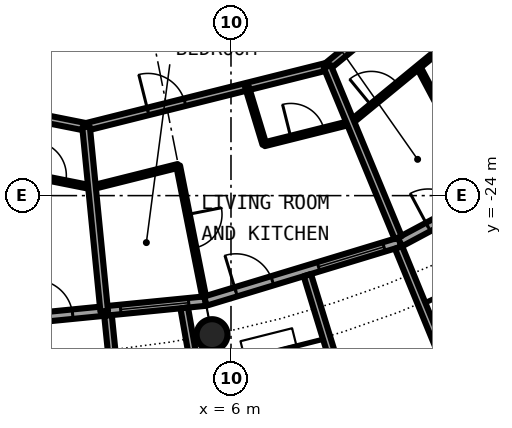
"""IFC4 building model, lengths in metres.
Left out: names, types, materials, properties, quantities, classifications, styles, units other than length and angle.
Written with IfcOpenShell. Run it as: python <this file> out.ifc"""

import sys

from ifc_helpers import new_model, si_unit, direction, frame, frame_2d, origin, origin_2d, place, context, subcontext, project, spatial, rectangle, circle, hollow_circle, extrude, element, fill, save


model = new_model("IFC4")
c1 = context("Model", 3, precision=1e-05, world=origin(), true_north=direction((0.0, 1.0)))
c2 = subcontext(c1, "Body", "Model", "MODEL_VIEW")
j1 = project(units=[si_unit("LENGTHUNIT", "METRE"), si_unit("PLANEANGLEUNIT", "RADIAN")], contexts=[c1])
p1 = place(None, origin())
s1 = spatial("IfcSite", under=j1, at=p1, CompositionType="ELEMENT")
p2 = place(p1, origin())
s2 = spatial("IfcBuilding", under=s1, at=p2, CompositionType="ELEMENT")
p3 = place(p2, frame((0.0, 0.0, 154.35)))
s3 = spatial("IfcBuildingStorey", under=s2, at=p3, CompositionType="ELEMENT", Elevation=154.35)
p4 = place(p3, frame((5.501, -27.658, 0.0), z_axis=(0.0, 0.0, 1.0), x_axis=(1.0, 0.0, 0.0)))
e1 = element("IfcColumn", 1, at=p4, inside=s3, PredefinedType="COLUMN", context=c2, shape_type="SweptSolid", body=[
    extrude(hollow_circle(Radius=0.406, WallThickness=0.04, at=origin_2d()), origin(), (0.0, 0.0, 1.0), 3.05),
])
p5 = place(p3, frame((0.0, -27.3, 0.0), z_axis=(0.0, 0.0, 1.0), x_axis=(0.995173996315, 0.098126026407, 0.0)))
e2 = element("IfcWall", 2, at=p5, inside=s3, PredefinedType="SOLIDWALL", context=c2, shape_type="SweptSolid", body=[
    extrude(rectangle(XDim=5.352, YDim=0.25, at=frame_2d((2.676, 0.0))), origin(), (0.0, 0.0, 1.0), 2.7),
])
p6 = place(p5, frame((0.841, 0.0, 0.0)))
e3 = element("IfcOpeningElement", 3, at=p6, cuts=e2, PredefinedType="OPENING", context=c2, shape_type="SweptSolid", body=[
    extrude(rectangle(XDim=1.0, YDim=2.2, at=frame_2d((0.5, 1.1))), frame((0.0, 0.135, 0.0), z_axis=(0.0, -1.0, 0.0), x_axis=(1.0, 0.0, 0.0)), (0.0, 0.0, 1.0), 0.27),
])
p7 = place(p5, frame((3.111, 0.0, 0.3)))
e4 = element("IfcOpeningElement", 4, at=p7, cuts=e2, PredefinedType="OPENING", context=c2, shape_type="SweptSolid", body=[
    extrude(rectangle(XDim=1.8, YDim=2.1, at=frame_2d((0.9, 1.05))), frame((0.0, 0.135, 0.0), z_axis=(0.0, -1.0, 0.0), x_axis=(1.0, 0.0, 0.0)), (0.0, 0.0, 1.0), 0.27),
])
p8 = place(p3, frame((2.764, -27.153, -0.03), z_axis=(0.0, 0.0, 1.0), x_axis=(0.101505487237, -0.994834979311, 0.0)))
e5 = element("IfcWall", 5, at=p8, inside=s3, PredefinedType="SOLIDWALL", context=c2, shape_type="SweptSolid", body=[
    extrude(rectangle(XDim=3.007, YDim=0.2, at=frame_2d((1.503, 0.0))), origin(), (0.0, 0.0, 1.0), 2.73),
])
p9 = place(p3, frame((4.769, -26.956, -0.03), z_axis=(0.0, 0.0, 1.0), x_axis=(0.174056778901, -0.984735618183, 0.0)))
e6 = element("IfcWall", 6, at=p9, inside=s3, PredefinedType="SOLIDWALL", context=c2, shape_type="SweptSolid", body=[
    extrude(rectangle(XDim=2.925, YDim=0.2, at=frame_2d((1.462, 0.0))), origin(), (0.0, 0.0, 1.0), 2.73),
])
p10 = place(p3, frame((5.326, -26.775, 0.0), z_axis=(0.0, 0.0, 1.0), x_axis=(0.956965678721, 0.290201119486, 0.0)))
e7 = element("IfcWall", 7, at=p10, inside=s3, PredefinedType="SOLIDWALL", context=c2, shape_type="SweptSolid", body=[
    extrude(rectangle(XDim=5.351, YDim=0.25, at=frame_2d((2.676, 0.0))), origin(), (0.0, 0.0, 1.0), 2.7),
])
p11 = place(p10, frame((0.841, 0.0, 0.0)))
e8 = element("IfcOpeningElement", 8, at=p11, cuts=e7, PredefinedType="OPENING", context=c2, shape_type="SweptSolid", body=[
    extrude(rectangle(XDim=1.0, YDim=2.2, at=frame_2d((0.5, 1.1))), frame((0.0, 0.135, 0.0), z_axis=(0.0, -1.0, 0.0), x_axis=(1.0, 0.0, 0.0)), (0.0, 0.0, 1.0), 0.27),
])
p12 = place(p10, frame((3.111, 0.0, 0.3)))
e9 = element("IfcOpeningElement", 9, at=p12, cuts=e7, PredefinedType="OPENING", context=c2, shape_type="SweptSolid", body=[
    extrude(rectangle(XDim=1.8, YDim=2.1, at=frame_2d((0.9, 1.05))), frame((0.0, 0.135, 0.0), z_axis=(0.0, -1.0, 0.0), x_axis=(1.0, 0.0, 0.0)), (0.0, 0.0, 1.0), 0.27),
])
p13 = place(p3, frame((8.82, -29.093, -0.03), z_axis=(0.0, 0.0, 1.0), x_axis=(0.941461077774, 0.337121697664, 0.0)))
e10 = element("IfcWall", 10, at=p13, inside=s3, PredefinedType="SOLIDWALL", context=c2, shape_type="SweptSolid", body=[
    extrude(rectangle(XDim=2.993, YDim=0.2, at=frame_2d((1.497, 0.0))), origin(), (0.0, 0.0, 1.0), 2.73),
])
p14 = place(p13, frame((0.457, 0.0, 0.33)))
e11 = element("IfcOpeningElement", 11, at=p14, cuts=e10, PredefinedType="OPENING", context=c2, shape_type="SweptSolid", body=[
    extrude(circle(Radius=1.04, at=frame_2d((1.04, 1.04))), frame((0.0, 0.11, 0.0), z_axis=(0.0, -1.0, 0.0), x_axis=(1.0, 0.0, 0.0)), (0.0, 0.0, 1.0), 0.22),
])
p15 = place(p3, frame((8.009, -26.092, -0.03), z_axis=(0.0, 0.0, 1.0), x_axis=(0.293406695073, -0.955987715029, 0.0)))
e12 = element("IfcWall", 12, at=p15, inside=s3, PredefinedType="SOLIDWALL", context=c2, shape_type="SweptSolid", body=[
    extrude(rectangle(XDim=3.006, YDim=0.2, at=frame_2d((1.503, 0.0))), origin(), (0.0, 0.0, 1.0), 2.73),
])
p16 = place(p3, frame((10.409, -25.364, -0.03), z_axis=(0.0, 0.0, 1.0), x_axis=(0.379509886562, -0.925187681501, 0.0)))
e13 = element("IfcWall", 13, at=p16, inside=s3, PredefinedType="SOLIDWALL", context=c2, shape_type="SweptSolid", body=[
    extrude(rectangle(XDim=2.883, YDim=0.2, at=frame_2d((1.441, 0.0))), origin(), (0.0, 0.0, 1.0), 2.73),
])
p17 = place(p3, frame((10.447, -25.222, 0.0), z_axis=(0.0, 0.0, 1.0), x_axis=(0.881915646801, 0.471407246368, 0.0)))
e14 = element("IfcWall", 14, at=p17, inside=s3, PredefinedType="SOLIDWALL", context=c2, shape_type="SweptSolid", body=[
    extrude(rectangle(XDim=5.352, YDim=0.25, at=frame_2d((2.676, 0.0))), origin(), (0.0, 0.0, 1.0), 2.7),
])
p18 = place(p17, frame((0.841, 0.0, 0.0)))
e15 = element("IfcOpeningElement", 15, at=p18, cuts=e14, PredefinedType="OPENING", context=c2, shape_type="SweptSolid", body=[
    extrude(rectangle(XDim=1.0, YDim=2.2, at=frame_2d((0.5, 1.1))), frame((0.0, 0.135, 0.0), z_axis=(0.0, -1.0, 0.0), x_axis=(1.0, 0.0, 0.0)), (0.0, 0.0, 1.0), 0.27),
])
p19 = place(p17, frame((3.111, 0.0, 0.3)))
e16 = element("IfcOpeningElement", 16, at=p19, cuts=e14, PredefinedType="OPENING", context=c2, shape_type="SweptSolid", body=[
    extrude(rectangle(XDim=1.8, YDim=2.1, at=frame_2d((0.9, 1.05))), frame((0.0, 0.135, 0.0), z_axis=(0.0, -1.0, 0.0), x_axis=(1.0, 0.0, 0.0)), (0.0, 0.0, 1.0), 0.27),
])
p20 = place(p3, frame((2.341, -23.785, 0.0), z_axis=(0.0, 0.0, 1.0), x_axis=(0.970124059177, 0.242609376996, 0.0)))
e17 = element("IfcWall", 17, at=p20, inside=s3, PredefinedType="PARTITIONING", context=c2, shape_type="SweptSolid", body=[
    extrude(rectangle(XDim=2.337, YDim=0.1, at=frame_2d((1.168, 0.0))), origin(), (0.0, 0.0, 1.0), 2.7),
])
p21 = place(p3, frame((6.878, -22.649, 0.0), z_axis=(0.0, 0.0, 1.0), x_axis=(0.9700564467, 0.242879579658, 0.0)))
e18 = element("IfcWall", 18, at=p21, inside=s3, PredefinedType="PARTITIONING", context=c2, shape_type="SweptSolid", body=[
    extrude(rectangle(XDim=2.338, YDim=0.1, at=frame_2d((1.169, 0.0))), origin(), (0.0, 0.0, 1.0), 2.7),
])
p22 = place(p21, frame((0.719, 0.0, 0.0)))
e19 = element("IfcOpeningElement", 19, at=p22, cuts=e18, PredefinedType="OPENING", context=c2, shape_type="SweptSolid", body=[
    extrude(rectangle(XDim=0.9, YDim=2.3, at=frame_2d((0.45, 1.15))), frame((0.0, 0.06, 0.0), z_axis=(0.0, -1.0, 0.0), x_axis=(1.0, 0.0, 0.0)), (0.0, 0.0, 1.0), 0.12),
])
p23 = place(p3, frame((0.074, -23.334, 0.0), z_axis=(0.0, 0.0, 1.0), x_axis=(0.98081942231, -0.194918600496, 0.0)))
e20 = element("IfcWall", 20, at=p23, inside=s3, PredefinedType="PARTITIONING", context=c2, shape_type="SweptSolid", body=[
    extrude(rectangle(XDim=2.313, YDim=0.1, at=frame_2d((1.157, 0.0))), origin(), (0.0, 0.0, 1.0), 2.7),
])
p24 = place(p23, frame((0.707, 0.0, 0.0)))
e21 = element("IfcOpeningElement", 21, at=p24, cuts=e20, PredefinedType="OPENING", context=c2, shape_type="SweptSolid", body=[
    extrude(rectangle(XDim=0.9, YDim=2.3, at=frame_2d((0.45, 1.15))), frame((0.0, 0.06, 0.0), z_axis=(0.0, -1.0, 0.0), x_axis=(1.0, 0.0, 0.0)), (0.0, 0.0, 1.0), 0.12),
])
p25 = place(p3, frame((9.146, -22.081, 0.0), z_axis=(0.0, 0.0, 1.0), x_axis=(0.772956112865, 0.634459492469, 0.0)))
e22 = element("IfcWall", 22, at=p25, inside=s3, PredefinedType="PARTITIONING", context=c2, shape_type="SweptSolid", body=[
    extrude(rectangle(XDim=6.938, YDim=0.1, at=frame_2d((3.469, 0.0))), origin(), (0.0, 0.0, 1.0), 2.7),
])
p26 = place(p25, frame((3.018, 0.0, 0.0)))
e23 = element("IfcOpeningElement", 23, at=p26, cuts=e22, PredefinedType="OPENING", context=c2, shape_type="SweptSolid", body=[
    extrude(rectangle(XDim=0.9, YDim=2.3, at=frame_2d((0.45, 1.15))), frame((0.0, 0.06, 0.0), z_axis=(0.0, -1.0, 0.0), x_axis=(1.0, 0.0, 0.0)), (0.0, 0.0, 1.0), 0.12),
])
p27 = place(p25, frame((0.709, 0.0, 0.0)))
e24 = element("IfcOpeningElement", 24, at=p27, cuts=e22, PredefinedType="OPENING", context=c2, shape_type="SweptSolid", body=[
    extrude(rectangle(XDim=0.9, YDim=2.3, at=frame_2d((0.45, 1.15))), frame((0.0, 0.06, 0.0), z_axis=(0.0, -1.0, 0.0), x_axis=(1.0, 0.0, 0.0)), (0.0, 0.0, 1.0), 0.12),
])
p28 = place(p3, frame((2.186, -22.193, 0.0), z_axis=(0.0, 0.0, 1.0), x_axis=(0.97003047456, 0.242983288366, 0.0)))
e25 = element("IfcWall", 25, at=p28, inside=s3, PredefinedType="PARTITIONING", context=c2, shape_type="SweptSolid", body=[
    extrude(rectangle(XDim=6.544, YDim=0.2, at=frame_2d((3.272, 0.0))), origin(), (0.0, 0.0, 1.0), 2.7),
])
p29 = place(p28, frame((1.681, 0.0, 0.0)))
e26 = element("IfcOpeningElement", 26, at=p29, cuts=e25, PredefinedType="OPENING", context=c2, shape_type="SweptSolid", body=[
    extrude(rectangle(XDim=1.0, YDim=2.3, at=frame_2d((0.5, 1.15))), frame((0.0, 0.11, 0.0), z_axis=(0.0, -1.0, 0.0), x_axis=(1.0, 0.0, 0.0)), (0.0, 0.0, 1.0), 0.22),
])
p30 = place(p3, frame((-10.512, -19.667, 0.0), z_axis=(0.0, 0.0, 1.0), x_axis=(0.980780341017, -0.195115152343, 0.0)))
e27 = element("IfcWall", 27, at=p30, inside=s3, PredefinedType="PARTITIONING", context=c2, shape_type="SweptSolid", body=[
    extrude(rectangle(XDim=12.947, YDim=0.2, at=frame_2d((6.473, 0.0))), origin(), (0.0, 0.0, 1.0), 2.7),
])
p31 = place(p30, frame((4.894, 0.0, 0.0)))
e28 = element("IfcOpeningElement", 28, at=p31, cuts=e27, PredefinedType="OPENING", context=c2, shape_type="SweptSolid", body=[
    extrude(rectangle(XDim=1.0, YDim=2.3, at=frame_2d((0.5, 1.15))), frame((0.0, 0.11, 0.0), z_axis=(0.0, -1.0, 0.0), x_axis=(1.0, 0.0, 0.0)), (0.0, 0.0, 1.0), 0.22),
])
p32 = place(p3, frame((8.534, -20.603, 0.0), z_axis=(0.0, 0.0, 1.0), x_axis=(0.772983503654, 0.634426121056, 0.0)))
e29 = element("IfcWall", 29, at=p32, inside=s3, PredefinedType="PARTITIONING", context=c2, shape_type="SweptSolid", body=[
    extrude(rectangle(XDim=12.947, YDim=0.2, at=frame_2d((6.474, 0.0))), origin(), (0.0, 0.0, 1.0), 2.7),
])
p33 = place(p32, frame((4.895, 0.0, 0.0)))
e30 = element("IfcOpeningElement", 30, at=p33, cuts=e29, PredefinedType="OPENING", context=c2, shape_type="SweptSolid", body=[
    extrude(rectangle(XDim=1.0, YDim=2.3, at=frame_2d((0.5, 1.15))), frame((0.0, 0.11, 0.0), z_axis=(0.0, -1.0, 0.0), x_axis=(1.0, 0.0, 0.0)), (0.0, 0.0, 1.0), 0.22),
])
p34 = place(p3, frame((2.186, -22.193, 0.0), z_axis=(0.0, 0.0, 1.0), x_axis=(0.098070432075, -0.995179476453, 0.0)))
e31 = element("IfcWall", 31, at=p34, inside=s3, PredefinedType="PARTITIONING", context=c2, shape_type="SweptSolid", body=[
    extrude(rectangle(XDim=4.874, YDim=0.2, at=frame_2d((2.437, 0.0))), origin(), (0.0, 0.0, 1.0), 2.7),
])
p35 = place(p3, frame((4.61, -23.217, 0.0), z_axis=(0.0, 0.0, 1.0), x_axis=(0.194816685017, -0.980839670506, 0.0)))
e32 = element("IfcWall", 32, at=p35, inside=s3, PredefinedType="PARTITIONING", context=c2, shape_type="SweptSolid", body=[
    extrude(rectangle(XDim=3.505, YDim=0.1, at=frame_2d((1.752, 0.0))), origin(), (0.0, 0.0, 1.0), 2.7),
])
p36 = place(p35, frame((1.303, 0.0, 0.0)))
e33 = element("IfcOpeningElement", 33, at=p36, cuts=e32, PredefinedType="OPENING", context=c2, shape_type="SweptSolid", body=[
    extrude(rectangle(XDim=0.9, YDim=2.3, at=frame_2d((0.45, 1.15))), frame((0.0, 0.06, 0.0), z_axis=(0.0, -1.0, 0.0), x_axis=(1.0, 0.0, 0.0)), (0.0, 0.0, 1.0), 0.12),
])
p37 = place(p3, frame((8.534, -20.603, 0.0), z_axis=(0.0, 0.0, 1.0), x_axis=(0.382651153718, -0.923892902104, 0.0)))
e34 = element("IfcWall", 34, at=p37, inside=s3, PredefinedType="PARTITIONING", context=c2, shape_type="SweptSolid", body=[
    extrude(rectangle(XDim=4.874, YDim=0.2, at=frame_2d((2.437, 0.0))), origin(), (0.0, 0.0, 1.0), 2.7),
])
p38 = place(p3, frame((10.934, -20.614, 0.0), z_axis=(0.0, 0.0, 1.0), x_axis=(0.468594334564, -0.883413464701, 0.0)))
e35 = element("IfcWall", 35, at=p38, inside=s3, PredefinedType="PARTITIONING", context=c2, shape_type="SweptSolid", body=[
    extrude(rectangle(XDim=3.841, YDim=0.1, at=frame_2d((1.92, 0.0))), origin(), (0.0, 0.0, 1.0), 2.7),
])
p39 = place(p3, frame((6.418, -21.133, 0.0), z_axis=(0.0, 0.0, 1.0), x_axis=(0.290358126892, -0.95691805195, 0.0)))
e36 = element("IfcWall", 36, at=p39, inside=s3, PredefinedType="PARTITIONING", context=c2, shape_type="SweptSolid", body=[
    extrude(rectangle(XDim=1.584, YDim=0.1, at=frame_2d((0.792, 0.0))), origin(), (0.0, 0.0, 1.0), 2.7),
])
p40 = place(p6, origin())
e37 = element("IfcDoor", 37, at=p40, inside=s3, OperationType="SINGLE_SWING_LEFT", PredefinedType="DOOR", context=c2, shape_type="SweptSolid", body=[
    extrude(rectangle(XDim=1.0, YDim=2.2, at=frame_2d((0.5, 1.1))), frame((0.0, 0.025, 0.0), z_axis=(0.0, -1.0, 0.0), x_axis=(1.0, 0.0, 0.0)), (0.0, 0.0, 1.0), 0.05),
])
fill(e3, e37)
p41 = place(p7, origin())
e38 = element("IfcWindow", 38, at=p41, inside=s3, PartitioningType="SINGLE_PANEL", PredefinedType="WINDOW", context=c2, shape_type="SweptSolid", body=[
    extrude(rectangle(XDim=1.8, YDim=2.1, at=frame_2d((0.9, 1.05))), frame((0.0, 0.03, 0.0), z_axis=(0.0, -1.0, 0.0), x_axis=(1.0, 0.0, 0.0)), (0.0, 0.0, 1.0), 0.06),
])
fill(e4, e38)
p42 = place(p11, origin())
e39 = element("IfcDoor", 39, at=p42, inside=s3, OperationType="SINGLE_SWING_LEFT", PredefinedType="DOOR", context=c2, shape_type="SweptSolid", body=[
    extrude(rectangle(XDim=1.0, YDim=2.2, at=frame_2d((0.5, 1.1))), frame((0.0, 0.025, 0.0), z_axis=(0.0, -1.0, 0.0), x_axis=(1.0, 0.0, 0.0)), (0.0, 0.0, 1.0), 0.05),
])
fill(e8, e39)
p43 = place(p12, origin())
e40 = element("IfcWindow", 40, at=p43, inside=s3, PartitioningType="SINGLE_PANEL", PredefinedType="WINDOW", context=c2, shape_type="SweptSolid", body=[
    extrude(rectangle(XDim=1.8, YDim=2.1, at=frame_2d((0.9, 1.05))), frame((0.0, 0.03, 0.0), z_axis=(0.0, -1.0, 0.0), x_axis=(1.0, 0.0, 0.0)), (0.0, 0.0, 1.0), 0.06),
])
fill(e9, e40)
p44 = place(p18, origin())
e41 = element("IfcDoor", 41, at=p44, inside=s3, OperationType="SINGLE_SWING_LEFT", PredefinedType="DOOR", context=c2, shape_type="SweptSolid", body=[
    extrude(rectangle(XDim=1.0, YDim=2.2, at=frame_2d((0.5, 1.1))), frame((0.0, 0.025, 0.0), z_axis=(0.0, -1.0, 0.0), x_axis=(1.0, 0.0, 0.0)), (0.0, 0.0, 1.0), 0.05),
])
fill(e15, e41)
p45 = place(p24, origin())
e42 = element("IfcDoor", 42, at=p45, inside=s3, OperationType="SINGLE_SWING_RIGHT", PredefinedType="DOOR", context=c2, shape_type="SweptSolid", body=[
    extrude(rectangle(XDim=0.9, YDim=2.3, at=frame_2d((0.45, 1.15))), frame((0.0, 0.025, 0.0), z_axis=(0.0, -1.0, 0.0), x_axis=(1.0, 0.0, 0.0)), (0.0, 0.0, 1.0), 0.05),
])
fill(e21, e42)
p46 = place(p29, origin())
e43 = element("IfcDoor", 43, at=p46, inside=s3, OperationType="SINGLE_SWING_LEFT", PredefinedType="DOOR", context=c2, shape_type="SweptSolid", body=[
    extrude(rectangle(XDim=1.0, YDim=2.3, at=frame_2d((0.5, 1.15))), frame((0.0, 0.025, 0.0), z_axis=(0.0, -1.0, 0.0), x_axis=(1.0, 0.0, 0.0)), (0.0, 0.0, 1.0), 0.05),
])
fill(e26, e43)
p47 = place(p22, origin())
e44 = element("IfcDoor", 44, at=p47, inside=s3, OperationType="SINGLE_SWING_LEFT", PredefinedType="DOOR", context=c2, shape_type="SweptSolid", body=[
    extrude(rectangle(XDim=0.9, YDim=2.3, at=frame_2d((0.45, 1.15))), frame((0.0, 0.025, 0.0), z_axis=(0.0, -1.0, 0.0), x_axis=(1.0, 0.0, 0.0)), (0.0, 0.0, 1.0), 0.05),
])
fill(e19, e44)
p48 = place(p36, origin())
e45 = element("IfcDoor", 45, at=p48, inside=s3, OperationType="SINGLE_SWING_RIGHT", PredefinedType="DOOR", context=c2, shape_type="SweptSolid", body=[
    extrude(rectangle(XDim=0.9, YDim=2.3, at=frame_2d((0.45, 1.15))), frame((0.0, 0.025, 0.0), z_axis=(0.0, -1.0, 0.0), x_axis=(1.0, 0.0, 0.0)), (0.0, 0.0, 1.0), 0.05),
])
fill(e33, e45)
p49 = place(p27, origin())
e46 = element("IfcDoor", 46, at=p49, inside=s3, OperationType="SINGLE_SWING_LEFT", PredefinedType="DOOR", context=c2, shape_type="SweptSolid", body=[
    extrude(rectangle(XDim=0.9, YDim=2.3, at=frame_2d((0.45, 1.15))), frame((0.0, 0.025, 0.0), z_axis=(0.0, -1.0, 0.0), x_axis=(1.0, 0.0, 0.0)), (0.0, 0.0, 1.0), 0.05),
])
fill(e24, e46)
save(model, sys.argv[1])
